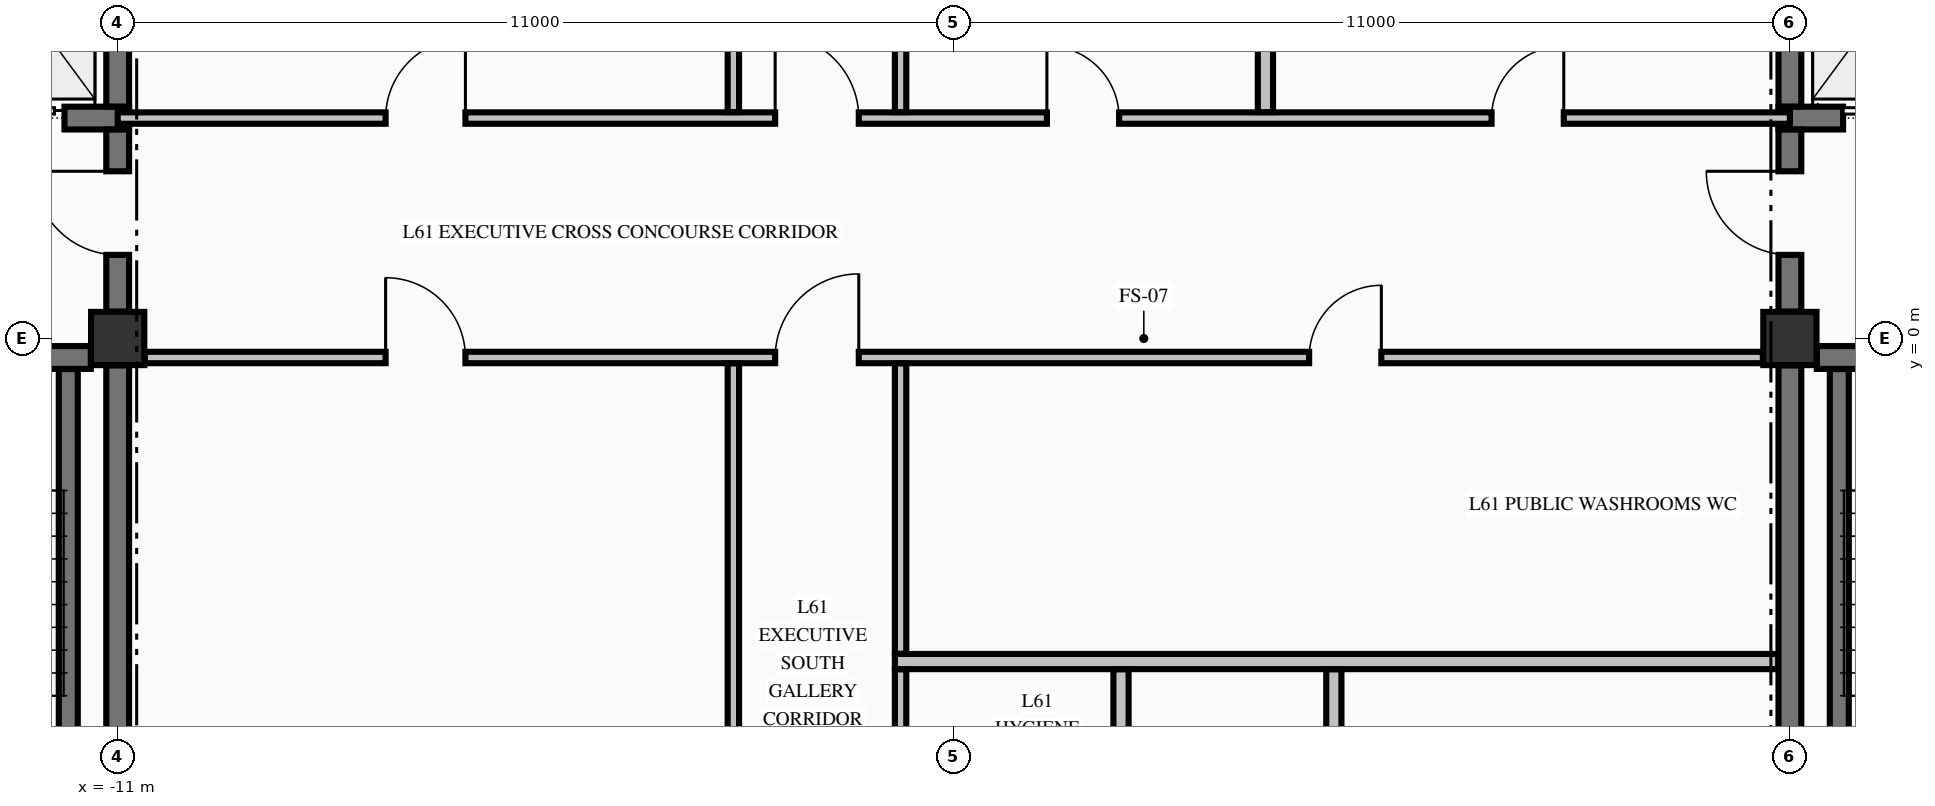
"""IFC4 building model, lengths in metres.
Left out: names, types, materials, properties, quantities, classifications, styles, units other than length and angle.
Written with IfcOpenShell. Run it as: python <this file> out.ifc"""

import sys

from ifc_helpers import new_model, si_unit, direction, frame, frame_2d, origin, origin_2d, place, context, subcontext, project, spatial, rectangle, extrude, element, fill, save


model = new_model("IFC4")
c1 = context("Model", 3, precision=1e-05, world=origin(), true_north=direction((0.0, 1.0)))
c2 = subcontext(c1, "Body", "Model", "MODEL_VIEW")
j1 = project(units=[si_unit("LENGTHUNIT", "METRE"), si_unit("PLANEANGLEUNIT", "RADIAN")], contexts=[c1])
p1 = place(None, origin())
s1 = spatial("IfcSite", under=j1, at=p1, CompositionType="ELEMENT")
p2 = place(p1, origin())
s2 = spatial("IfcBuilding", under=s1, at=p2, CompositionType="ELEMENT")
p3 = place(p2, frame((0.0, 0.0, 233.28)))
s3 = spatial("IfcBuildingStorey", under=s2, at=p3, CompositionType="ELEMENT", Elevation=233.28)
for number, where, z_axis, x_axis in (
    (1, (-11.0, 0.0, -0.25), (0.0, 0.0, 1.0), (1.0, 0.0, 0.0)),
    (2, (11.0, 0.0, -0.25), (0.0, 0.0, 1.0), (1.0, 0.0, 0.0)),
):
    element("IfcColumn", number, at=place(p3, frame(where, z_axis=z_axis, x_axis=x_axis)), inside=s3, PredefinedType="COLUMN", context=c2, shape_type="SweptSolid", body=[
        extrude(rectangle(XDim=0.7, YDim=0.7, at=origin_2d()), origin(), (0.0, 0.0, 1.0), 3.23),
    ])
p4 = place(p3, frame((-20.571, -0.25, 0.0), z_axis=(0.0, 0.0, 1.0), x_axis=(1.0, 0.0, 0.0)))
e3 = element("IfcWall", 3, at=p4, inside=s3, PredefinedType="SHEAR", context=c2, shape_type="SweptSolid", body=[
    extrude(rectangle(XDim=9.217, YDim=0.3, at=frame_2d((4.608, 0.0))), origin(), (0.0, 0.0, 1.0), 2.98),
])
p5 = place(p4, frame((6.871, 0.0, 0.0)))
e4 = element("IfcOpeningElement", 4, at=p5, cuts=e3, PredefinedType="OPENING", context=c2, shape_type="SweptSolid", body=[
    extrude(rectangle(XDim=1.1, YDim=2.15, at=frame_2d((0.55, 1.075))), frame((0.0, 0.16, 0.0), z_axis=(0.0, -1.0, 0.0), x_axis=(1.0, 0.0, 0.0)), (0.0, 0.0, 1.0), 0.32),
])
p6 = place(p3, frame((11.354, -0.25, 0.0), z_axis=(0.0, 0.0, 1.0), x_axis=(1.0, 0.0, 0.0)))
e5 = element("IfcWall", 5, at=p6, inside=s3, PredefinedType="SHEAR", context=c2, shape_type="SweptSolid", body=[
    extrude(rectangle(XDim=3.521, YDim=0.3, at=frame_2d((1.76, 0.0))), origin(), (0.0, 0.0, 1.0), 2.98),
])
p7 = place(p6, frame((1.246, 0.0, 0.0)))
e6 = element("IfcOpeningElement", 6, at=p7, cuts=e5, PredefinedType="OPENING", context=c2, shape_type="SweptSolid", body=[
    extrude(rectangle(XDim=1.1, YDim=2.15, at=frame_2d((0.55, 1.075))), frame((0.0, 0.16, 0.0), z_axis=(0.0, -1.0, 0.0), x_axis=(1.0, 0.0, 0.0)), (0.0, 0.0, 1.0), 0.32),
])
p8 = place(p3, frame((-14.875, 2.9, 0.0), z_axis=(0.0, 0.0, 1.0), x_axis=(1.0, 0.0, 0.0)))
e7 = element("IfcWall", 7, at=p8, inside=s3, PredefinedType="SHEAR", context=c2, shape_type="SweptSolid", body=[
    extrude(rectangle(XDim=4.025, YDim=0.3, at=frame_2d((2.012, 0.0))), origin(), (0.0, 0.0, 1.0), 2.98),
])
p9 = place(p8, frame((2.075, 0.0, 0.0)))
e8 = element("IfcOpeningElement", 8, at=p9, cuts=e7, PredefinedType="OPENING", context=c2, shape_type="SweptSolid", body=[
    extrude(rectangle(XDim=1.1, YDim=2.2, at=frame_2d((0.55, 1.1))), frame((0.0, 0.16, 0.0), z_axis=(0.0, -1.0, 0.0), x_axis=(1.0, 0.0, 0.0)), (0.0, 0.0, 1.0), 0.32),
])
p10 = place(p3, frame((10.85, 2.9, 0.0), z_axis=(0.0, 0.0, 1.0), x_axis=(1.0, 0.0, 0.0)))
e9 = element("IfcWall", 9, at=p10, inside=s3, PredefinedType="SHEAR", context=c2, shape_type="SweptSolid", body=[
    extrude(rectangle(XDim=4.025, YDim=0.3, at=frame_2d((2.012, 0.0))), origin(), (0.0, 0.0, 1.0), 2.98),
])
p11 = place(p10, frame((0.85, 0.0, 0.0)))
e10 = element("IfcOpeningElement", 10, at=p11, cuts=e9, PredefinedType="OPENING", context=c2, shape_type="SweptSolid", body=[
    extrude(rectangle(XDim=1.1, YDim=2.2, at=frame_2d((0.55, 1.1))), frame((0.0, 0.16, 0.0), z_axis=(0.0, -1.0, 0.0), x_axis=(1.0, 0.0, 0.0)), (0.0, 0.0, 1.0), 0.32),
])
p12 = place(p3, frame((-0.775, -4.25, 0.0), z_axis=(0.0, 0.0, 1.0), x_axis=(1.0, 0.0, 0.0)))
e11 = element("IfcWall", 11, at=p12, inside=s3, PredefinedType="PARTITIONING", context=c2, shape_type="SweptSolid", body=[
    extrude(rectangle(XDim=11.622, YDim=0.2, at=frame_2d((5.811, 0.0))), origin(), (0.0, 0.0, 1.0), 2.98),
])
p13 = place(p3, frame((-10.644, -0.25, 0.0), z_axis=(0.0, 0.0, 1.0), x_axis=(1.0, 0.0, 0.0)))
e12 = element("IfcWall", 12, at=p13, inside=s3, PredefinedType="PARTITIONING", context=c2, shape_type="SweptSolid", body=[
    extrude(rectangle(XDim=21.288, YDim=0.15, at=frame_2d((10.644, 0.0))), origin(), (0.0, 0.0, 1.0), 2.98),
])
p14 = place(p13, frame((8.294, 0.0, 0.0)))
e13 = element("IfcOpeningElement", 13, at=p14, cuts=e12, PredefinedType="OPENING", context=c2, shape_type="SweptSolid", body=[
    extrude(rectangle(XDim=1.1, YDim=2.15, at=frame_2d((0.55, 1.075))), frame((0.0, 0.085, 0.0), z_axis=(0.0, -1.0, 0.0), x_axis=(1.0, 0.0, 0.0)), (0.0, 0.0, 1.0), 0.17),
])
p15 = place(p13, frame((3.169, 0.0, 0.0)))
e14 = element("IfcOpeningElement", 14, at=p15, cuts=e12, PredefinedType="OPENING", context=c2, shape_type="SweptSolid", body=[
    extrude(rectangle(XDim=1.05, YDim=2.15, at=frame_2d((0.525, 1.075))), frame((0.0, 0.085, 0.0), z_axis=(0.0, -1.0, 0.0), x_axis=(1.0, 0.0, 0.0)), (0.0, 0.0, 1.0), 0.17),
])
p16 = place(p13, frame((15.319, 0.0, 0.0)))
e15 = element("IfcOpeningElement", 15, at=p16, cuts=e12, PredefinedType="OPENING", context=c2, shape_type="SweptSolid", body=[
    extrude(rectangle(XDim=0.95, YDim=2.15, at=frame_2d((0.475, 1.075))), frame((0.0, 0.085, 0.0), z_axis=(0.0, -1.0, 0.0), x_axis=(1.0, 0.0, 0.0)), (0.0, 0.0, 1.0), 0.17),
])
p17 = place(p3, frame((-11.0, 2.9, 0.0), z_axis=(0.0, 0.0, 1.0), x_axis=(1.0, 0.0, 0.0)))
e16 = element("IfcWall", 16, at=p17, inside=s3, PredefinedType="PARTITIONING", context=c2, shape_type="SweptSolid", body=[
    extrude(rectangle(XDim=22.0, YDim=0.15, at=frame_2d((11.0, 0.0))), origin(), (0.0, 0.0, 1.0), 2.98),
])
p18 = place(p17, frame((8.65, 0.0, 0.0)))
e17 = element("IfcOpeningElement", 17, at=p18, cuts=e16, PredefinedType="OPENING", context=c2, shape_type="SweptSolid", body=[
    extrude(rectangle(XDim=1.1, YDim=2.15, at=frame_2d((0.55, 1.075))), frame((0.0, 0.085, 0.0), z_axis=(0.0, -1.0, 0.0), x_axis=(1.0, 0.0, 0.0)), (0.0, 0.0, 1.0), 0.17),
])
p19 = place(p17, frame((3.525, 0.0, 0.0)))
e18 = element("IfcOpeningElement", 18, at=p19, cuts=e16, PredefinedType="OPENING", context=c2, shape_type="SweptSolid", body=[
    extrude(rectangle(XDim=1.05, YDim=2.15, at=frame_2d((0.525, 1.075))), frame((0.0, 0.085, 0.0), z_axis=(0.0, -1.0, 0.0), x_axis=(1.0, 0.0, 0.0)), (0.0, 0.0, 1.0), 0.17),
])
p20 = place(p17, frame((12.225, 0.0, 0.0)))
e19 = element("IfcOpeningElement", 19, at=p20, cuts=e16, PredefinedType="OPENING", context=c2, shape_type="SweptSolid", body=[
    extrude(rectangle(XDim=0.95, YDim=2.15, at=frame_2d((0.475, 1.075))), frame((0.0, 0.085, 0.0), z_axis=(0.0, -1.0, 0.0), x_axis=(1.0, 0.0, 0.0)), (0.0, 0.0, 1.0), 0.17),
])
p21 = place(p17, frame((18.075, 0.0, 0.0)))
e20 = element("IfcOpeningElement", 20, at=p21, cuts=e16, PredefinedType="OPENING", context=c2, shape_type="SweptSolid", body=[
    extrude(rectangle(XDim=0.95, YDim=2.15, at=frame_2d((0.475, 1.075))), frame((0.0, 0.085, 0.0), z_axis=(0.0, -1.0, 0.0), x_axis=(1.0, 0.0, 0.0)), (0.0, 0.0, 1.0), 0.17),
])
p22 = place(p3, frame((-11.65, -9.798, 0.0), z_axis=(0.0, 0.0, 1.0), x_axis=(0.0, 1.0, 0.0)))
e21 = element("IfcWall", 21, at=p22, inside=s3, PredefinedType="SOLIDWALL", context=c2, shape_type="SweptSolid", body=[
    extrude(rectangle(XDim=9.396, YDim=0.25, at=frame_2d((4.698, 0.0))), origin(), (0.0, 0.0, 1.0), 2.98),
])
p23 = place(p3, frame((-11.0, -9.596, 0.0), z_axis=(0.0, 0.0, 1.0), x_axis=(0.0, 1.0, 0.0)))
e22 = element("IfcWall", 22, at=p23, inside=s3, PredefinedType="SHEAR", context=c2, shape_type="SweptSolid", body=[
    extrude(rectangle(XDim=9.242, YDim=0.3, at=frame_2d((4.621, 0.0))), origin(), (0.0, 0.0, 1.0), 2.98),
])
p24 = place(p3, frame((-11.0, 0.354, 0.0), z_axis=(0.0, 0.0, 1.0), x_axis=(0.0, 1.0, 0.0)))
e23 = element("IfcWall", 23, at=p24, inside=s3, PredefinedType="SHEAR", context=c2, shape_type="SweptSolid", body=[
    extrude(rectangle(XDim=2.394, YDim=0.3, at=frame_2d((1.197, 0.0))), origin(), (0.0, 0.0, 1.0), 2.98),
])
p25 = place(p24, frame((0.746, 0.0, 0.0)))
e24 = element("IfcOpeningElement", 24, at=p25, cuts=e23, PredefinedType="OPENING", context=c2, shape_type="SweptSolid", body=[
    extrude(rectangle(XDim=1.1, YDim=2.15, at=frame_2d((0.55, 1.075))), frame((0.0, 0.16, 0.0), z_axis=(0.0, -1.0, 0.0), x_axis=(1.0, 0.0, 0.0)), (0.0, 0.0, 1.0), 0.32),
])
p26 = place(p3, frame((-11.0, 3.052, 0.0), z_axis=(0.0, 0.0, 1.0), x_axis=(0.0, 1.0, 0.0)))
e25 = element("IfcWall", 25, at=p26, inside=s3, PredefinedType="SHEAR", context=c2, shape_type="SweptSolid", body=[
    extrude(rectangle(XDim=2.496, YDim=0.3, at=frame_2d((1.248, 0.0))), origin(), (0.0, 0.0, 1.0), 2.98),
])
p27 = place(p3, frame((11.0, -9.596, 0.0), z_axis=(0.0, 0.0, 1.0), x_axis=(0.0, 1.0, 0.0)))
e26 = element("IfcWall", 26, at=p27, inside=s3, PredefinedType="SHEAR", context=c2, shape_type="SweptSolid", body=[
    extrude(rectangle(XDim=9.242, YDim=0.3, at=frame_2d((4.621, 0.0))), origin(), (0.0, 0.0, 1.0), 2.98),
])
p28 = place(p3, frame((11.0, 0.354, 0.0), z_axis=(0.0, 0.0, 1.0), x_axis=(0.0, 1.0, 0.0)))
e27 = element("IfcWall", 27, at=p28, inside=s3, PredefinedType="SHEAR", context=c2, shape_type="SweptSolid", body=[
    extrude(rectangle(XDim=2.394, YDim=0.3, at=frame_2d((1.197, 0.0))), origin(), (0.0, 0.0, 1.0), 2.98),
])
p29 = place(p28, frame((0.746, 0.0, 0.0)))
e28 = element("IfcOpeningElement", 28, at=p29, cuts=e27, PredefinedType="OPENING", context=c2, shape_type="SweptSolid", body=[
    extrude(rectangle(XDim=1.1, YDim=2.15, at=frame_2d((0.55, 1.075))), frame((0.0, 0.16, 0.0), z_axis=(0.0, -1.0, 0.0), x_axis=(1.0, 0.0, 0.0)), (0.0, 0.0, 1.0), 0.32),
])
p30 = place(p3, frame((11.0, 3.052, 0.0), z_axis=(0.0, 0.0, 1.0), x_axis=(0.0, 1.0, 0.0)))
e29 = element("IfcWall", 29, at=p30, inside=s3, PredefinedType="SHEAR", context=c2, shape_type="SweptSolid", body=[
    extrude(rectangle(XDim=2.496, YDim=0.3, at=frame_2d((1.248, 0.0))), origin(), (0.0, 0.0, 1.0), 2.98),
])
p31 = place(p3, frame((11.65, -9.798, 0.0), z_axis=(0.0, 0.0, 1.0), x_axis=(0.0, 1.0, 0.0)))
e30 = element("IfcWall", 30, at=p31, inside=s3, PredefinedType="SOLIDWALL", context=c2, shape_type="SweptSolid", body=[
    extrude(rectangle(XDim=9.396, YDim=0.25, at=frame_2d((4.698, 0.0))), origin(), (0.0, 0.0, 1.0), 2.98),
])
p32 = place(p3, frame((-2.9, -9.872, 0.0), z_axis=(0.0, 0.0, 1.0), x_axis=(0.0, 1.0, 0.0)))
e31 = element("IfcWall", 31, at=p32, inside=s3, PredefinedType="PARTITIONING", context=c2, shape_type="SweptSolid", body=[
    extrude(rectangle(XDim=9.544, YDim=0.15, at=frame_2d((4.772, 0.0))), origin(), (0.0, 0.0, 1.0), 2.98),
])
p33 = place(p3, frame((-2.9, 2.978, 0.0), z_axis=(0.0, 0.0, 1.0), x_axis=(0.0, 1.0, 0.0)))
e32 = element("IfcWall", 32, at=p33, inside=s3, PredefinedType="PARTITIONING", context=c2, shape_type="SweptSolid", body=[
    extrude(rectangle(XDim=7.444, YDim=0.15, at=frame_2d((3.722, 0.0))), origin(), (0.0, 0.0, 1.0), 2.98),
])
p34 = place(p3, frame((-0.7, -9.872, 0.0), z_axis=(0.0, 0.0, 1.0), x_axis=(0.0, 1.0, 0.0)))
e33 = element("IfcWall", 33, at=p34, inside=s3, PredefinedType="PARTITIONING", context=c2, shape_type="SweptSolid", body=[
    extrude(rectangle(XDim=5.519, YDim=0.15, at=frame_2d((2.76, 0.0))), origin(), (0.0, 0.0, 1.0), 2.98),
])
p35 = place(p34, frame((2.597, 0.0, 0.0)))
e34 = element("IfcOpeningElement", 34, at=p35, cuts=e33, PredefinedType="OPENING", context=c2, shape_type="SweptSolid", body=[
    extrude(rectangle(XDim=0.95, YDim=2.15, at=frame_2d((0.475, 1.075))), frame((0.0, 0.085, 0.0), z_axis=(0.0, -1.0, 0.0), x_axis=(1.0, 0.0, 0.0)), (0.0, 0.0, 1.0), 0.17),
])
p36 = place(p3, frame((-0.7, -4.147, 0.0), z_axis=(0.0, 0.0, 1.0), x_axis=(0.0, 1.0, 0.0)))
e35 = element("IfcWall", 35, at=p36, inside=s3, PredefinedType="PARTITIONING", context=c2, shape_type="SweptSolid", body=[
    extrude(rectangle(XDim=3.819, YDim=0.15, at=frame_2d((1.91, 0.0))), origin(), (0.0, 0.0, 1.0), 2.98),
])
p37 = place(p3, frame((-0.7, 2.978, 0.0), z_axis=(0.0, 0.0, 1.0), x_axis=(0.0, 1.0, 0.0)))
e36 = element("IfcWall", 36, at=p37, inside=s3, PredefinedType="PARTITIONING", context=c2, shape_type="SweptSolid", body=[
    extrude(rectangle(XDim=7.444, YDim=0.15, at=frame_2d((3.722, 0.0))), origin(), (0.0, 0.0, 1.0), 2.98),
])
p38 = place(p3, frame((2.2, -9.872, 0.0), z_axis=(0.0, 0.0, 1.0), x_axis=(0.0, 1.0, 0.0)))
e37 = element("IfcWall", 37, at=p38, inside=s3, PredefinedType="PARTITIONING", context=c2, shape_type="SweptSolid", body=[
    extrude(rectangle(XDim=5.519, YDim=0.2, at=frame_2d((2.76, 0.0))), origin(), (0.0, 0.0, 1.0), 2.98),
])
p39 = place(p3, frame((4.1, 2.978, 0.0), z_axis=(0.0, 0.0, 1.0), x_axis=(0.0, 1.0, 0.0)))
e38 = element("IfcWall", 38, at=p39, inside=s3, PredefinedType="PARTITIONING", context=c2, shape_type="SweptSolid", body=[
    extrude(rectangle(XDim=7.444, YDim=0.2, at=frame_2d((3.722, 0.0))), origin(), (0.0, 0.0, 1.0), 2.98),
])
p40 = place(p3, frame((5.0, -9.872, 0.0), z_axis=(0.0, 0.0, 1.0), x_axis=(0.0, 1.0, 0.0)))
e39 = element("IfcWall", 39, at=p40, inside=s3, PredefinedType="PARTITIONING", context=c2, shape_type="SweptSolid", body=[
    extrude(rectangle(XDim=5.519, YDim=0.2, at=frame_2d((2.76, 0.0))), origin(), (0.0, 0.0, 1.0), 2.98),
])
p41 = place(p25, origin())
e40 = element("IfcDoor", 40, at=p41, inside=s3, OperationType="SINGLE_SWING_RIGHT", PredefinedType="DOOR", context=c2, shape_type="SweptSolid", body=[
    extrude(rectangle(XDim=1.1, YDim=2.15, at=frame_2d((0.55, 1.075))), frame((0.0, 0.025, 0.0), z_axis=(0.0, -1.0, 0.0), x_axis=(1.0, 0.0, 0.0)), (0.0, 0.0, 1.0), 0.05),
])
fill(e24, e40)
p42 = place(p9, origin())
e41 = element("IfcDoor", 41, at=p42, inside=s3, OperationType="SLIDING_TO_LEFT", PredefinedType="DOOR", context=c2, shape_type="SweptSolid", body=[
    extrude(rectangle(XDim=1.1, YDim=2.2, at=frame_2d((0.55, 1.1))), frame((0.0, 0.025, 0.0), z_axis=(0.0, -1.0, 0.0), x_axis=(1.0, 0.0, 0.0)), (0.0, 0.0, 1.0), 0.05),
])
fill(e8, e41)
p43 = place(p29, origin())
e42 = element("IfcDoor", 42, at=p43, inside=s3, OperationType="SINGLE_SWING_RIGHT", PredefinedType="DOOR", context=c2, shape_type="SweptSolid", body=[
    extrude(rectangle(XDim=1.1, YDim=2.15, at=frame_2d((0.55, 1.075))), frame((0.0, 0.025, 0.0), z_axis=(0.0, -1.0, 0.0), x_axis=(1.0, 0.0, 0.0)), (0.0, 0.0, 1.0), 0.05),
])
fill(e28, e42)
p44 = place(p11, origin())
e43 = element("IfcDoor", 43, at=p44, inside=s3, OperationType="SLIDING_TO_RIGHT", PredefinedType="DOOR", context=c2, shape_type="SweptSolid", body=[
    extrude(rectangle(XDim=1.1, YDim=2.2, at=frame_2d((0.55, 1.1))), frame((0.0, 0.025, 0.0), z_axis=(0.0, -1.0, 0.0), x_axis=(1.0, 0.0, 0.0)), (0.0, 0.0, 1.0), 0.05),
])
fill(e10, e43)
p45 = place(p18, origin())
e44 = element("IfcDoor", 44, at=p45, inside=s3, OperationType="SINGLE_SWING_LEFT", PredefinedType="DOOR", context=c2, shape_type="SweptSolid", body=[
    extrude(rectangle(XDim=1.1, YDim=2.15, at=frame_2d((0.55, 1.075))), frame((0.0, 0.025, 0.0), z_axis=(0.0, -1.0, 0.0), x_axis=(1.0, 0.0, 0.0)), (0.0, 0.0, 1.0), 0.05),
])
fill(e17, e44)
p46 = place(p14, origin())
e45 = element("IfcDoor", 45, at=p46, inside=s3, OperationType="SINGLE_SWING_RIGHT", PredefinedType="DOOR", context=c2, shape_type="SweptSolid", body=[
    extrude(rectangle(XDim=1.1, YDim=2.15, at=frame_2d((0.55, 1.075))), frame((0.0, 0.025, 0.0), z_axis=(0.0, -1.0, 0.0), x_axis=(1.0, 0.0, 0.0)), (0.0, 0.0, 1.0), 0.05),
])
fill(e13, e45)
p47 = place(p19, origin())
e46 = element("IfcDoor", 46, at=p47, inside=s3, OperationType="SINGLE_SWING_RIGHT", PredefinedType="DOOR", context=c2, shape_type="SweptSolid", body=[
    extrude(rectangle(XDim=1.05, YDim=2.15, at=frame_2d((0.525, 1.075))), frame((0.0, 0.025, 0.0), z_axis=(0.0, -1.0, 0.0), x_axis=(1.0, 0.0, 0.0)), (0.0, 0.0, 1.0), 0.05),
])
fill(e18, e46)
p48 = place(p20, origin())
e47 = element("IfcDoor", 47, at=p48, inside=s3, OperationType="SINGLE_SWING_LEFT", PredefinedType="DOOR", context=c2, shape_type="SweptSolid", body=[
    extrude(rectangle(XDim=0.95, YDim=2.15, at=frame_2d((0.475, 1.075))), frame((0.0, 0.025, 0.0), z_axis=(0.0, -1.0, 0.0), x_axis=(1.0, 0.0, 0.0)), (0.0, 0.0, 1.0), 0.05),
])
fill(e19, e47)
p49 = place(p21, origin())
e48 = element("IfcDoor", 48, at=p49, inside=s3, OperationType="SINGLE_SWING_RIGHT", PredefinedType="DOOR", context=c2, shape_type="SweptSolid", body=[
    extrude(rectangle(XDim=0.95, YDim=2.15, at=frame_2d((0.475, 1.075))), frame((0.0, 0.025, 0.0), z_axis=(0.0, -1.0, 0.0), x_axis=(1.0, 0.0, 0.0)), (0.0, 0.0, 1.0), 0.05),
])
fill(e20, e48)
p50 = place(p15, origin())
e49 = element("IfcDoor", 49, at=p50, inside=s3, OperationType="SINGLE_SWING_LEFT", PredefinedType="DOOR", context=c2, shape_type="SweptSolid", body=[
    extrude(rectangle(XDim=1.05, YDim=2.15, at=frame_2d((0.525, 1.075))), frame((0.0, 0.025, 0.0), z_axis=(0.0, -1.0, 0.0), x_axis=(1.0, 0.0, 0.0)), (0.0, 0.0, 1.0), 0.05),
])
fill(e14, e49)
p51 = place(p16, origin())
e50 = element("IfcDoor", 50, at=p51, inside=s3, OperationType="SINGLE_SWING_RIGHT", PredefinedType="DOOR", context=c2, shape_type="SweptSolid", body=[
    extrude(rectangle(XDim=0.95, YDim=2.15, at=frame_2d((0.475, 1.075))), frame((0.0, 0.025, 0.0), z_axis=(0.0, -1.0, 0.0), x_axis=(1.0, 0.0, 0.0)), (0.0, 0.0, 1.0), 0.05),
])
fill(e15, e50)
save(model, sys.argv[1])
